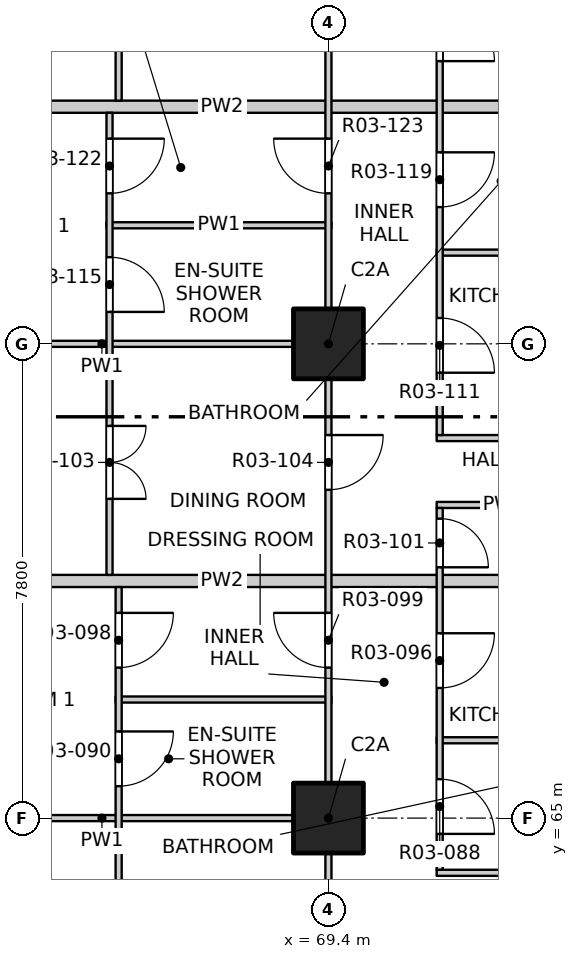
"""IFC4 building model, lengths in metres.
Left out: names, types, materials, properties, quantities, classifications, styles, units other than length and angle.
Written with IfcOpenShell. Run it as: python <this file> out.ifc"""

import sys

from ifc_helpers import new_model, si_unit, direction, frame, frame_2d, origin, origin_2d, place, context, subcontext, project, spatial, rectangle, extrude, element, fill, save


model = new_model("IFC4")
c1 = context("Model", 3, precision=1e-05, world=origin(), true_north=direction((0.0, 1.0)))
c2 = subcontext(c1, "Body", "Model", "MODEL_VIEW")
j1 = project(units=[si_unit("LENGTHUNIT", "METRE"), si_unit("PLANEANGLEUNIT", "RADIAN")], contexts=[c1])
p1 = place(None, origin())
s1 = spatial("IfcSite", under=j1, at=p1, CompositionType="ELEMENT")
p2 = place(p1, origin())
s2 = spatial("IfcBuilding", under=s1, at=p2, CompositionType="ELEMENT")
p3 = place(p2, frame((0.0, 0.0, 39.9)))
s3 = spatial("IfcBuildingStorey", under=s2, at=p3, CompositionType="ELEMENT", Elevation=39.9)
for number, where, z_axis, x_axis in (
    (1, (69.4, 65.0, -0.25), (0.0, 0.0, 1.0), (1.0, 0.0, 0.0)),
    (2, (69.4, 72.8, -0.25), (0.0, 0.0, 1.0), (1.0, 0.0, 0.0)),
):
    element("IfcColumn", number, at=place(p3, frame(where, z_axis=z_axis, x_axis=x_axis)), inside=s3, PredefinedType="COLUMN", context=c2, shape_type="SweptSolid", body=[
        extrude(rectangle(XDim=1.15, YDim=1.15, at=origin_2d()), origin(), (0.0, 0.0, 1.0), 3.4),
    ])
p4 = place(p3, frame((71.18, 64.1, 0.0), z_axis=(0.0, 0.0, 1.0), x_axis=(1.0, 0.0, 0.0)))
e3 = element("IfcWall", 3, at=p4, inside=s3, PredefinedType="PARTITIONING", context=c2, shape_type="SweptSolid", body=[
    extrude(rectangle(XDim=2.22, YDim=0.1, at=frame_2d((1.11, 0.0))), origin(), (0.0, 0.0, 1.0), 3.15),
])
p5 = place(p3, frame((61.9, 65.0, 0.0), z_axis=(0.0, 0.0, 1.0), x_axis=(1.0, 0.0, 0.0)))
e4 = element("IfcWall", 4, at=p5, inside=s3, PredefinedType="PARTITIONING", context=c2, shape_type="SweptSolid", body=[
    extrude(rectangle(XDim=7.55, YDim=0.1, at=frame_2d((3.775, 0.0))), origin(), (0.0, 0.0, 1.0), 2.55),
])
p6 = place(p3, frame((71.18, 66.28, 0.0), z_axis=(0.0, 0.0, 1.0), x_axis=(1.0, 0.0, 0.0)))
e5 = element("IfcWall", 5, at=p6, inside=s3, PredefinedType="PARTITIONING", context=c2, shape_type="SweptSolid", body=[
    extrude(rectangle(XDim=2.22, YDim=0.1, at=frame_2d((1.11, 0.0))), origin(), (0.0, 0.0, 1.0), 3.15),
])
p7 = place(p3, frame((65.9, 66.95, 0.0), z_axis=(0.0, 0.0, 1.0), x_axis=(1.0, 0.0, 0.0)))
e6 = element("IfcWall", 6, at=p7, inside=s3, PredefinedType="PARTITIONING", context=c2, shape_type="SweptSolid", body=[
    extrude(rectangle(XDim=3.55, YDim=0.1, at=frame_2d((1.775, 0.0))), origin(), (0.0, 0.0, 1.0), 3.15),
])
p8 = place(p3, frame((61.9, 68.9, 0.0), z_axis=(0.0, 0.0, 1.0), x_axis=(1.0, 0.0, 0.0)))
e7 = element("IfcWall", 7, at=p8, inside=s3, PredefinedType="PARTITIONING", context=c2, shape_type="SweptSolid", body=[
    extrude(rectangle(XDim=11.5, YDim=0.2, at=frame_2d((5.75, 0.0))), origin(), (0.0, 0.0, 1.0), 3.15),
])
for number, where, z_axis, x_axis in (
    (8, (71.18, 70.15, 0.0), (0.0, 0.0, 1.0), (1.0, 0.0, 0.0)),
    (9, (71.18, 71.25, 0.0), (0.0, 0.0, 1.0), (1.0, 0.0, 0.0)),
):
    element("IfcWall", number, at=place(p3, frame(where, z_axis=z_axis, x_axis=x_axis)), inside=s3, PredefinedType="PARTITIONING", context=c2, shape_type="SweptSolid", body=[
        extrude(rectangle(XDim=2.22, YDim=0.1, at=frame_2d((1.11, 0.0))), origin(), (0.0, 0.0, 1.0), 3.15),
    ])
p9 = place(p3, frame((61.9, 72.8, 0.0), z_axis=(0.0, 0.0, 1.0), x_axis=(1.0, 0.0, 0.0)))
e10 = element("IfcWall", 10, at=p9, inside=s3, PredefinedType="PARTITIONING", context=c2, shape_type="SweptSolid", body=[
    extrude(rectangle(XDim=7.55, YDim=0.1, at=frame_2d((3.775, 0.0))), origin(), (0.0, 0.0, 1.0), 2.55),
])
p10 = place(p3, frame((71.18, 74.3, 0.0), z_axis=(0.0, 0.0, 1.0), x_axis=(1.0, 0.0, 0.0)))
e11 = element("IfcWall", 11, at=p10, inside=s3, PredefinedType="PARTITIONING", context=c2, shape_type="SweptSolid", body=[
    extrude(rectangle(XDim=2.22, YDim=0.1, at=frame_2d((1.11, 0.0))), origin(), (0.0, 0.0, 1.0), 3.15),
])
p11 = place(p3, frame((65.75, 74.75, 0.0), z_axis=(0.0, 0.0, 1.0), x_axis=(1.0, 0.0, 0.0)))
e12 = element("IfcWall", 12, at=p11, inside=s3, PredefinedType="PARTITIONING", context=c2, shape_type="SweptSolid", body=[
    extrude(rectangle(XDim=3.7, YDim=0.1, at=frame_2d((1.85, 0.0))), origin(), (0.0, 0.0, 1.0), 3.15),
])
p12 = place(p3, frame((61.9, 76.7, 0.0), z_axis=(0.0, 0.0, 1.0), x_axis=(1.0, 0.0, 0.0)))
e13 = element("IfcWall", 13, at=p12, inside=s3, PredefinedType="PARTITIONING", context=c2, shape_type="SweptSolid", body=[
    extrude(rectangle(XDim=11.5, YDim=0.2, at=frame_2d((5.75, 0.0))), origin(), (0.0, 0.0, 1.0), 3.15),
])
p13 = place(p3, frame((65.8, 69.0, 0.0), z_axis=(0.0, 0.0, 1.0), x_axis=(0.0, 1.0, 0.0)))
e14 = element("IfcWall", 14, at=p13, inside=s3, PredefinedType="PARTITIONING", context=c2, shape_type="SweptSolid", body=[
    extrude(rectangle(XDim=7.6, YDim=0.1, at=frame_2d((3.8, 0.0))), origin(), (0.0, 0.0, 1.0), 3.15),
])
p14 = place(p13, frame((1.25, 0.0, 0.0)))
e15 = element("IfcOpeningElement", 15, at=p14, cuts=e14, PredefinedType="OPENING", context=c2, shape_type="SweptSolid", body=[
    extrude(rectangle(XDim=1.2, YDim=2.1, at=frame_2d((0.6, 1.05))), frame((0.0, 0.06, 0.0), z_axis=(0.0, -1.0, 0.0), x_axis=(1.0, 0.0, 0.0)), (0.0, 0.0, 1.0), 0.12),
])
p15 = place(p13, frame((4.325, 0.0, 0.0)))
e16 = element("IfcOpeningElement", 16, at=p15, cuts=e14, PredefinedType="OPENING", context=c2, shape_type="SweptSolid", body=[
    extrude(rectangle(XDim=0.9, YDim=2.1, at=frame_2d((0.45, 1.05))), frame((0.0, 0.06, 0.0), z_axis=(0.0, -1.0, 0.0), x_axis=(1.0, 0.0, 0.0)), (0.0, 0.0, 1.0), 0.12),
])
p16 = place(p13, frame((6.275, 0.0, 0.0)))
e17 = element("IfcOpeningElement", 17, at=p16, cuts=e14, PredefinedType="OPENING", context=c2, shape_type="SweptSolid", body=[
    extrude(rectangle(XDim=0.9, YDim=2.1, at=frame_2d((0.45, 1.05))), frame((0.0, 0.06, 0.0), z_axis=(0.0, -1.0, 0.0), x_axis=(1.0, 0.0, 0.0)), (0.0, 0.0, 1.0), 0.12),
])
p17 = place(p3, frame((65.95, 61.2, 0.0), z_axis=(0.0, 0.0, 1.0), x_axis=(0.0, 1.0, 0.0)))
e18 = element("IfcWall", 18, at=p17, inside=s3, PredefinedType="PARTITIONING", context=c2, shape_type="SweptSolid", body=[
    extrude(rectangle(XDim=7.6, YDim=0.1, at=frame_2d((3.8, 0.0))), origin(), (0.0, 0.0, 1.0), 3.15),
])
p18 = place(p17, frame((1.25, 0.0, 0.0)))
e19 = element("IfcOpeningElement", 19, at=p18, cuts=e18, PredefinedType="OPENING", context=c2, shape_type="SweptSolid", body=[
    extrude(rectangle(XDim=1.2, YDim=2.1, at=frame_2d((0.6, 1.05))), frame((0.0, 0.06, 0.0), z_axis=(0.0, -1.0, 0.0), x_axis=(1.0, 0.0, 0.0)), (0.0, 0.0, 1.0), 0.12),
])
p19 = place(p17, frame((4.325, 0.0, 0.0)))
e20 = element("IfcOpeningElement", 20, at=p19, cuts=e18, PredefinedType="OPENING", context=c2, shape_type="SweptSolid", body=[
    extrude(rectangle(XDim=0.9, YDim=2.1, at=frame_2d((0.45, 1.05))), frame((0.0, 0.06, 0.0), z_axis=(0.0, -1.0, 0.0), x_axis=(1.0, 0.0, 0.0)), (0.0, 0.0, 1.0), 0.12),
])
p20 = place(p17, frame((6.275, 0.0, 0.0)))
e21 = element("IfcOpeningElement", 21, at=p20, cuts=e18, PredefinedType="OPENING", context=c2, shape_type="SweptSolid", body=[
    extrude(rectangle(XDim=0.9, YDim=2.1, at=frame_2d((0.45, 1.05))), frame((0.0, 0.06, 0.0), z_axis=(0.0, -1.0, 0.0), x_axis=(1.0, 0.0, 0.0)), (0.0, 0.0, 1.0), 0.12),
])
p21 = place(p3, frame((65.95, 76.8, 0.0), z_axis=(0.0, 0.0, 1.0), x_axis=(0.0, 1.0, 0.0)))
e22 = element("IfcWall", 22, at=p21, inside=s3, PredefinedType="PARTITIONING", context=c2, shape_type="SweptSolid", body=[
    extrude(rectangle(XDim=11.3, YDim=0.1, at=frame_2d((5.65, 0.0))), origin(), (0.0, 0.0, 1.0), 3.15),
])
p22 = place(p21, frame((1.25, 0.0, 0.0)))
e23 = element("IfcOpeningElement", 23, at=p22, cuts=e22, PredefinedType="OPENING", context=c2, shape_type="SweptSolid", body=[
    extrude(rectangle(XDim=1.2, YDim=2.1, at=frame_2d((0.6, 1.05))), frame((0.0, 0.06, 0.0), z_axis=(0.0, -1.0, 0.0), x_axis=(1.0, 0.0, 0.0)), (0.0, 0.0, 1.0), 0.12),
])
p23 = place(p21, frame((5.15, 0.0, 0.0)))
e24 = element("IfcOpeningElement", 24, at=p23, cuts=e22, PredefinedType="OPENING", context=c2, shape_type="SweptSolid", body=[
    extrude(rectangle(XDim=1.2, YDim=2.1, at=frame_2d((0.6, 1.05))), frame((0.0, 0.06, 0.0), z_axis=(0.0, -1.0, 0.0), x_axis=(1.0, 0.0, 0.0)), (0.0, 0.0, 1.0), 0.12),
])
p24 = place(p21, frame((9.05, 0.0, 0.0)))
e25 = element("IfcOpeningElement", 25, at=p24, cuts=e22, PredefinedType="OPENING", context=c2, shape_type="SweptSolid", body=[
    extrude(rectangle(XDim=1.2, YDim=2.1, at=frame_2d((0.6, 1.05))), frame((0.0, 0.06, 0.0), z_axis=(0.0, -1.0, 0.0), x_axis=(1.0, 0.0, 0.0)), (0.0, 0.0, 1.0), 0.12),
])
p25 = place(p3, frame((69.4, 41.9, 0.0), z_axis=(0.0, 0.0, 1.0), x_axis=(0.0, 1.0, 0.0)))
e26 = element("IfcWall", 26, at=p25, inside=s3, PredefinedType="PARTITIONING", context=c2, shape_type="SweptSolid", body=[
    extrude(rectangle(XDim=46.2, YDim=0.1, at=frame_2d((23.1, 0.0))), origin(), (0.0, 0.0, 1.0), 3.15),
])
p26 = place(p25, frame((1.2, 0.0, 0.0)))
e27 = element("IfcOpeningElement", 27, at=p26, cuts=e26, PredefinedType="OPENING", context=c2, shape_type="SweptSolid", body=[
    extrude(rectangle(XDim=0.9, YDim=2.1, at=frame_2d((0.45, 1.05))), frame((0.0, 0.06, 0.0), z_axis=(0.0, -1.0, 0.0), x_axis=(1.0, 0.0, 0.0)), (0.0, 0.0, 1.0), 0.12),
])
p27 = place(p25, frame((5.9, 0.0, 0.0)))
e28 = element("IfcOpeningElement", 28, at=p27, cuts=e26, PredefinedType="OPENING", context=c2, shape_type="SweptSolid", body=[
    extrude(rectangle(XDim=0.9, YDim=2.1, at=frame_2d((0.45, 1.05))), frame((0.0, 0.06, 0.0), z_axis=(0.0, -1.0, 0.0), x_axis=(1.0, 0.0, 0.0)), (0.0, 0.0, 1.0), 0.12),
])
p28 = place(p25, frame((9.0, 0.0, 0.0)))
e29 = element("IfcOpeningElement", 29, at=p28, cuts=e26, PredefinedType="OPENING", context=c2, shape_type="SweptSolid", body=[
    extrude(rectangle(XDim=0.9, YDim=2.1, at=frame_2d((0.45, 1.05))), frame((0.0, 0.06, 0.0), z_axis=(0.0, -1.0, 0.0), x_axis=(1.0, 0.0, 0.0)), (0.0, 0.0, 1.0), 0.12),
])
p29 = place(p25, frame((13.725, 0.0, 0.0)))
e30 = element("IfcOpeningElement", 30, at=p29, cuts=e26, PredefinedType="OPENING", context=c2, shape_type="SweptSolid", body=[
    extrude(rectangle(XDim=0.9, YDim=2.1, at=frame_2d((0.45, 1.05))), frame((0.0, 0.06, 0.0), z_axis=(0.0, -1.0, 0.0), x_axis=(1.0, 0.0, 0.0)), (0.0, 0.0, 1.0), 0.12),
])
p30 = place(p25, frame((17.775, 0.0, 0.0)))
e31 = element("IfcOpeningElement", 31, at=p30, cuts=e26, PredefinedType="OPENING", context=c2, shape_type="SweptSolid", body=[
    extrude(rectangle(XDim=0.9, YDim=2.1, at=frame_2d((0.45, 1.05))), frame((0.0, 0.06, 0.0), z_axis=(0.0, -1.0, 0.0), x_axis=(1.0, 0.0, 0.0)), (0.0, 0.0, 1.0), 0.12),
])
p31 = place(p25, frame((20.7, 0.0, 0.0)))
e32 = element("IfcOpeningElement", 32, at=p31, cuts=e26, PredefinedType="OPENING", context=c2, shape_type="SweptSolid", body=[
    extrude(rectangle(XDim=0.9, YDim=2.1, at=frame_2d((0.45, 1.05))), frame((0.0, 0.06, 0.0), z_axis=(0.0, -1.0, 0.0), x_axis=(1.0, 0.0, 0.0)), (0.0, 0.0, 1.0), 0.12),
])
p32 = place(p25, frame((25.575, 0.0, 0.0)))
e33 = element("IfcOpeningElement", 33, at=p32, cuts=e26, PredefinedType="OPENING", context=c2, shape_type="SweptSolid", body=[
    extrude(rectangle(XDim=0.9, YDim=2.1, at=frame_2d((0.45, 1.05))), frame((0.0, 0.06, 0.0), z_axis=(0.0, -1.0, 0.0), x_axis=(1.0, 0.0, 0.0)), (0.0, 0.0, 1.0), 0.12),
])
p33 = place(p25, frame((28.5, 0.0, 0.0)))
e34 = element("IfcOpeningElement", 34, at=p33, cuts=e26, PredefinedType="OPENING", context=c2, shape_type="SweptSolid", body=[
    extrude(rectangle(XDim=0.9, YDim=2.1, at=frame_2d((0.45, 1.05))), frame((0.0, 0.06, 0.0), z_axis=(0.0, -1.0, 0.0), x_axis=(1.0, 0.0, 0.0)), (0.0, 0.0, 1.0), 0.12),
])
p34 = place(p25, frame((33.375, 0.0, 0.0)))
e35 = element("IfcOpeningElement", 35, at=p34, cuts=e26, PredefinedType="OPENING", context=c2, shape_type="SweptSolid", body=[
    extrude(rectangle(XDim=0.9, YDim=2.1, at=frame_2d((0.45, 1.05))), frame((0.0, 0.06, 0.0), z_axis=(0.0, -1.0, 0.0), x_axis=(1.0, 0.0, 0.0)), (0.0, 0.0, 1.0), 0.12),
])
p35 = place(p25, frame((36.3, 0.0, 0.0)))
e36 = element("IfcOpeningElement", 36, at=p35, cuts=e26, PredefinedType="OPENING", context=c2, shape_type="SweptSolid", body=[
    extrude(rectangle(XDim=0.9, YDim=2.1, at=frame_2d((0.45, 1.05))), frame((0.0, 0.06, 0.0), z_axis=(0.0, -1.0, 0.0), x_axis=(1.0, 0.0, 0.0)), (0.0, 0.0, 1.0), 0.12),
])
p36 = place(p25, frame((40.2, 0.0, 0.0)))
e37 = element("IfcOpeningElement", 37, at=p36, cuts=e26, PredefinedType="OPENING", context=c2, shape_type="SweptSolid", body=[
    extrude(rectangle(XDim=0.9, YDim=2.1, at=frame_2d((0.45, 1.05))), frame((0.0, 0.06, 0.0), z_axis=(0.0, -1.0, 0.0), x_axis=(1.0, 0.0, 0.0)), (0.0, 0.0, 1.0), 0.12),
])
p37 = place(p25, frame((44.1, 0.0, 0.0)))
e38 = element("IfcOpeningElement", 38, at=p37, cuts=e26, PredefinedType="OPENING", context=c2, shape_type="SweptSolid", body=[
    extrude(rectangle(XDim=0.9, YDim=2.1, at=frame_2d((0.45, 1.05))), frame((0.0, 0.06, 0.0), z_axis=(0.0, -1.0, 0.0), x_axis=(1.0, 0.0, 0.0)), (0.0, 0.0, 1.0), 0.12),
])
p38 = place(p3, frame((71.23, 64.15, 0.0), z_axis=(0.0, 0.0, 1.0), x_axis=(0.0, 1.0, 0.0)))
e39 = element("IfcWall", 39, at=p38, inside=s3, PredefinedType="PARTITIONING", context=c2, shape_type="SweptSolid", body=[
    extrude(rectangle(XDim=5.95, YDim=0.1, at=frame_2d((2.975, 0.0))), origin(), (0.0, 0.0, 1.0), 3.15),
])
p39 = place(p38, frame((0.59, 0.0, 0.0)))
e40 = element("IfcOpeningElement", 40, at=p39, cuts=e39, PredefinedType="OPENING", context=c2, shape_type="SweptSolid", body=[
    extrude(rectangle(XDim=0.9, YDim=2.1, at=frame_2d((0.45, 1.05))), frame((0.0, 0.06, 0.0), z_axis=(0.0, -1.0, 0.0), x_axis=(1.0, 0.0, 0.0)), (0.0, 0.0, 1.0), 0.12),
])
p40 = place(p38, frame((2.99, 0.0, 0.0)))
e41 = element("IfcOpeningElement", 41, at=p40, cuts=e39, PredefinedType="OPENING", context=c2, shape_type="SweptSolid", body=[
    extrude(rectangle(XDim=0.9, YDim=2.1, at=frame_2d((0.45, 1.05))), frame((0.0, 0.06, 0.0), z_axis=(0.0, -1.0, 0.0), x_axis=(1.0, 0.0, 0.0)), (0.0, 0.0, 1.0), 0.12),
])
p41 = place(p38, frame((4.975, 0.0, 0.0)))
e42 = element("IfcOpeningElement", 42, at=p41, cuts=e39, PredefinedType="OPENING", context=c2, shape_type="SweptSolid", body=[
    extrude(rectangle(XDim=0.8, YDim=2.1, at=frame_2d((0.4, 1.05))), frame((0.0, 0.06, 0.0), z_axis=(0.0, -1.0, 0.0), x_axis=(1.0, 0.0, 0.0)), (0.0, 0.0, 1.0), 0.12),
])
p42 = place(p3, frame((71.23, 71.3, 0.0), z_axis=(0.0, 0.0, 1.0), x_axis=(0.0, 1.0, 0.0)))
e43 = element("IfcWall", 43, at=p42, inside=s3, PredefinedType="PARTITIONING", context=c2, shape_type="SweptSolid", body=[
    extrude(rectangle(XDim=10.95, YDim=0.1, at=frame_2d((5.475, 0.0))), origin(), (0.0, 0.0, 1.0), 3.15),
])
p43 = place(p42, frame((1.025, 0.0, 0.0)))
e44 = element("IfcOpeningElement", 44, at=p43, cuts=e43, PredefinedType="OPENING", context=c2, shape_type="SweptSolid", body=[
    extrude(rectangle(XDim=0.9, YDim=2.1, at=frame_2d((0.45, 1.05))), frame((0.0, 0.06, 0.0), z_axis=(0.0, -1.0, 0.0), x_axis=(1.0, 0.0, 0.0)), (0.0, 0.0, 1.0), 0.12),
])
p44 = place(p42, frame((3.75, 0.0, 0.0)))
e45 = element("IfcOpeningElement", 45, at=p44, cuts=e43, PredefinedType="OPENING", context=c2, shape_type="SweptSolid", body=[
    extrude(rectangle(XDim=0.9, YDim=2.1, at=frame_2d((0.45, 1.05))), frame((0.0, 0.06, 0.0), z_axis=(0.0, -1.0, 0.0), x_axis=(1.0, 0.0, 0.0)), (0.0, 0.0, 1.0), 0.12),
])
p45 = place(p42, frame((6.15, 0.0, 0.0)))
e46 = element("IfcOpeningElement", 46, at=p45, cuts=e43, PredefinedType="OPENING", context=c2, shape_type="SweptSolid", body=[
    extrude(rectangle(XDim=0.9, YDim=2.1, at=frame_2d((0.45, 1.05))), frame((0.0, 0.06, 0.0), z_axis=(0.0, -1.0, 0.0), x_axis=(1.0, 0.0, 0.0)), (0.0, 0.0, 1.0), 0.12),
])
p46 = place(p42, frame((8.95, 0.0, 0.0)))
e47 = element("IfcOpeningElement", 47, at=p46, cuts=e43, PredefinedType="OPENING", context=c2, shape_type="SweptSolid", body=[
    extrude(rectangle(XDim=0.9, YDim=2.1, at=frame_2d((0.45, 1.05))), frame((0.0, 0.06, 0.0), z_axis=(0.0, -1.0, 0.0), x_axis=(1.0, 0.0, 0.0)), (0.0, 0.0, 1.0), 0.12),
])
p47 = place(p39, origin())
e48 = element("IfcDoor", 48, at=p47, inside=s3, OperationType="SINGLE_SWING_RIGHT", PredefinedType="DOOR", context=c2, shape_type="SweptSolid", body=[
    extrude(rectangle(XDim=0.9, YDim=2.1, at=frame_2d((0.45, 1.05))), frame((0.0, 0.025, 0.0), z_axis=(0.0, -1.0, 0.0), x_axis=(1.0, 0.0, 0.0)), (0.0, 0.0, 1.0), 0.05),
])
fill(e40, e48)
p48 = place(p19, origin())
e49 = element("IfcDoor", 49, at=p48, inside=s3, OperationType="SINGLE_SWING_LEFT", PredefinedType="DOOR", context=c2, shape_type="SweptSolid", body=[
    extrude(rectangle(XDim=0.9, YDim=2.1, at=frame_2d((0.45, 1.05))), frame((0.0, 0.025, 0.0), z_axis=(0.0, -1.0, 0.0), x_axis=(1.0, 0.0, 0.0)), (0.0, 0.0, 1.0), 0.05),
])
fill(e20, e49)
p49 = place(p40, origin())
e50 = element("IfcDoor", 50, at=p49, inside=s3, OperationType="SINGLE_SWING_LEFT", PredefinedType="DOOR", context=c2, shape_type="SweptSolid", body=[
    extrude(rectangle(XDim=0.9, YDim=2.1, at=frame_2d((0.45, 1.05))), frame((0.0, 0.025, 0.0), z_axis=(0.0, -1.0, 0.0), x_axis=(1.0, 0.0, 0.0)), (0.0, 0.0, 1.0), 0.05),
])
fill(e41, e50)
p50 = place(p20, origin())
e51 = element("IfcDoor", 51, at=p50, inside=s3, OperationType="SINGLE_SWING_LEFT", PredefinedType="DOOR", context=c2, shape_type="SweptSolid", body=[
    extrude(rectangle(XDim=0.9, YDim=2.1, at=frame_2d((0.45, 1.05))), frame((0.0, 0.025, 0.0), z_axis=(0.0, -1.0, 0.0), x_axis=(1.0, 0.0, 0.0)), (0.0, 0.0, 1.0), 0.05),
])
fill(e21, e51)
p51 = place(p32, origin())
e52 = element("IfcDoor", 52, at=p51, inside=s3, OperationType="SINGLE_SWING_RIGHT", PredefinedType="DOOR", context=c2, shape_type="SweptSolid", body=[
    extrude(rectangle(XDim=0.9, YDim=2.1, at=frame_2d((0.45, 1.05))), frame((0.0, 0.025, 0.0), z_axis=(0.0, -1.0, 0.0), x_axis=(1.0, 0.0, 0.0)), (0.0, 0.0, 1.0), 0.05),
])
fill(e33, e52)
p52 = place(p41, origin())
e53 = element("IfcDoor", 53, at=p52, inside=s3, OperationType="SINGLE_SWING_RIGHT", PredefinedType="DOOR", context=c2, shape_type="SweptSolid", body=[
    extrude(rectangle(XDim=0.8, YDim=2.1, at=frame_2d((0.4, 1.05))), frame((0.0, 0.025, 0.0), z_axis=(0.0, -1.0, 0.0), x_axis=(1.0, 0.0, 0.0)), (0.0, 0.0, 1.0), 0.05),
])
fill(e42, e53)
p53 = place(p14, origin())
e54 = element("IfcDoor", 54, at=p53, inside=s3, OperationType="DOUBLE_DOOR_SINGLE_SWING", PredefinedType="DOOR", context=c2, shape_type="SweptSolid", body=[
    extrude(rectangle(XDim=1.2, YDim=2.1, at=frame_2d((0.6, 1.05))), frame((0.0, 0.025, 0.0), z_axis=(0.0, -1.0, 0.0), x_axis=(1.0, 0.0, 0.0)), (0.0, 0.0, 1.0), 0.05),
])
fill(e15, e54)
p54 = place(p33, origin())
e55 = element("IfcDoor", 55, at=p54, inside=s3, OperationType="SINGLE_SWING_LEFT", PredefinedType="DOOR", context=c2, shape_type="SweptSolid", body=[
    extrude(rectangle(XDim=0.9, YDim=2.1, at=frame_2d((0.45, 1.05))), frame((0.0, 0.025, 0.0), z_axis=(0.0, -1.0, 0.0), x_axis=(1.0, 0.0, 0.0)), (0.0, 0.0, 1.0), 0.05),
])
fill(e34, e55)
p55 = place(p43, origin())
e56 = element("IfcDoor", 56, at=p55, inside=s3, OperationType="SINGLE_SWING_RIGHT", PredefinedType="DOOR", context=c2, shape_type="SweptSolid", body=[
    extrude(rectangle(XDim=0.9, YDim=2.1, at=frame_2d((0.45, 1.05))), frame((0.0, 0.025, 0.0), z_axis=(0.0, -1.0, 0.0), x_axis=(1.0, 0.0, 0.0)), (0.0, 0.0, 1.0), 0.05),
])
fill(e44, e56)
p56 = place(p15, origin())
e57 = element("IfcDoor", 57, at=p56, inside=s3, OperationType="SINGLE_SWING_RIGHT", PredefinedType="DOOR", context=c2, shape_type="SweptSolid", body=[
    extrude(rectangle(XDim=0.9, YDim=2.1, at=frame_2d((0.45, 1.05))), frame((0.0, 0.025, 0.0), z_axis=(0.0, -1.0, 0.0), x_axis=(1.0, 0.0, 0.0)), (0.0, 0.0, 1.0), 0.05),
])
fill(e16, e57)
p57 = place(p44, origin())
e58 = element("IfcDoor", 58, at=p57, inside=s3, OperationType="SINGLE_SWING_LEFT", PredefinedType="DOOR", context=c2, shape_type="SweptSolid", body=[
    extrude(rectangle(XDim=0.9, YDim=2.1, at=frame_2d((0.45, 1.05))), frame((0.0, 0.025, 0.0), z_axis=(0.0, -1.0, 0.0), x_axis=(1.0, 0.0, 0.0)), (0.0, 0.0, 1.0), 0.05),
])
fill(e45, e58)
p58 = place(p16, origin())
e59 = element("IfcDoor", 59, at=p58, inside=s3, OperationType="SINGLE_SWING_LEFT", PredefinedType="DOOR", context=c2, shape_type="SweptSolid", body=[
    extrude(rectangle(XDim=0.9, YDim=2.1, at=frame_2d((0.45, 1.05))), frame((0.0, 0.025, 0.0), z_axis=(0.0, -1.0, 0.0), x_axis=(1.0, 0.0, 0.0)), (0.0, 0.0, 1.0), 0.05),
])
fill(e17, e59)
p59 = place(p34, origin())
e60 = element("IfcDoor", 60, at=p59, inside=s3, OperationType="SINGLE_SWING_RIGHT", PredefinedType="DOOR", context=c2, shape_type="SweptSolid", body=[
    extrude(rectangle(XDim=0.9, YDim=2.1, at=frame_2d((0.45, 1.05))), frame((0.0, 0.025, 0.0), z_axis=(0.0, -1.0, 0.0), x_axis=(1.0, 0.0, 0.0)), (0.0, 0.0, 1.0), 0.05),
])
fill(e35, e60)
p60 = place(p45, origin())
e61 = element("IfcDoor", 61, at=p60, inside=s3, OperationType="SINGLE_SWING_RIGHT", PredefinedType="DOOR", context=c2, shape_type="SweptSolid", body=[
    extrude(rectangle(XDim=0.9, YDim=2.1, at=frame_2d((0.45, 1.05))), frame((0.0, 0.025, 0.0), z_axis=(0.0, -1.0, 0.0), x_axis=(1.0, 0.0, 0.0)), (0.0, 0.0, 1.0), 0.05),
])
fill(e46, e61)
save(model, sys.argv[1])
